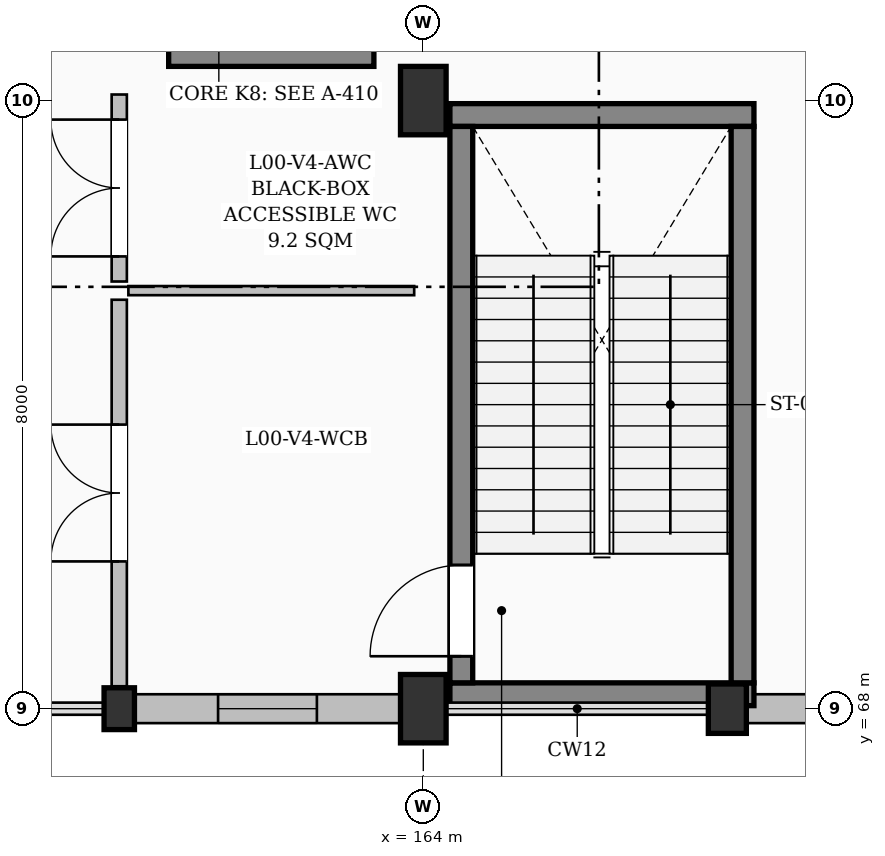
"""IFC4 building model, lengths in metres.
Left out: names, types, materials, properties, quantities, classifications, styles, units other than length and angle.
Written with IfcOpenShell. Run it as: python <this file> out.ifc"""

import sys

from ifc_helpers import new_model, si_unit, direction, frame, frame_2d, origin, origin_2d, place, context, subcontext, project, spatial, rectangle, extrude, element, fill, save


model = new_model("IFC4")
c1 = context("Model", 3, precision=1e-05, world=origin(), true_north=direction((0.0, 1.0)))
c2 = subcontext(c1, "Body", "Model", "MODEL_VIEW")
j1 = project(units=[si_unit("LENGTHUNIT", "METRE"), si_unit("PLANEANGLEUNIT", "RADIAN")], contexts=[c1])
p1 = place(None, origin())
s1 = spatial("IfcSite", under=j1, at=p1, CompositionType="ELEMENT")
p2 = place(p1, origin())
s2 = spatial("IfcBuilding", under=s1, at=p2, CompositionType="ELEMENT")
p3 = place(p2, origin())
s3 = spatial("IfcBuildingStorey", under=s2, at=p3, CompositionType="ELEMENT", Elevation=0.0)
p4 = place(p3, frame((160.0, 68.0, 0.0), z_axis=(0.0, 0.0, 1.0), x_axis=(1.0, 0.0, 0.0)))
e1 = element("IfcColumn", 1, at=p4, inside=s3, PredefinedType="PILASTER", context=c2, shape_type="SweptSolid", body=[
    extrude(rectangle(XDim=0.4, YDim=0.55, at=origin_2d()), origin(), (0.0, 0.0, 1.0), 4.8),
])
for number, where, z_axis, x_axis in (
    (2, (164.0, 68.0, 0.0), (0.0, 0.0, 1.0), (1.0, 0.0, 0.0)),
    (3, (164.0, 76.0, 0.0), (0.0, 0.0, 1.0), (1.0, 0.0, 0.0)),
):
    element("IfcColumn", number, at=place(p3, frame(where, z_axis=z_axis, x_axis=x_axis)), inside=s3, PredefinedType="COLUMN", context=c2, shape_type="SweptSolid", body=[
        extrude(rectangle(XDim=0.6, YDim=0.9, at=origin_2d()), origin(), (0.0, 0.0, 1.0), 4.8),
    ])
p5 = place(p3, frame((168.0, 68.0, 0.0), z_axis=(0.0, 0.0, 1.0), x_axis=(1.0, 0.0, 0.0)))
e4 = element("IfcColumn", 4, at=p5, inside=s3, PredefinedType="PILASTER", context=c2, shape_type="SweptSolid", body=[
    extrude(rectangle(XDim=0.5, YDim=0.65, at=origin_2d()), origin(), (0.0, 0.0, 1.0), 4.8),
])
p6 = place(p3, frame((171.675, 68.0, 0.0), z_axis=(0.0, 0.0, 1.0), x_axis=(-1.0, 0.0, 0.0)))
e5 = element("IfcWall", 5, at=p6, inside=s3, PredefinedType="SOLIDWALL", context=c2, shape_type="SweptSolid", body=[
    extrude(rectangle(XDim=3.425, YDim=0.38, at=frame_2d((1.712, 0.0))), origin(), (0.0, 0.0, 1.0), 4.035),
])
p7 = place(p6, frame((1.113, 0.0, 0.95)))
e6 = element("IfcOpeningElement", 6, at=p7, cuts=e5, PredefinedType="OPENING", context=c2, shape_type="SweptSolid", body=[
    extrude(rectangle(XDim=1.2, YDim=1.5, at=frame_2d((0.6, 0.75))), frame((0.0, 0.2, 0.0), z_axis=(0.0, -1.0, 0.0), x_axis=(1.0, 0.0, 0.0)), (0.0, 0.0, 1.0), 0.4),
])
p8 = place(p3, frame((163.7, 68.0, 0.0), z_axis=(0.0, 0.0, 1.0), x_axis=(-1.0, 0.0, 0.0)))
e7 = element("IfcWall", 7, at=p8, inside=s3, PredefinedType="SOLIDWALL", context=c2, shape_type="SweptSolid", body=[
    extrude(rectangle(XDim=3.5, YDim=0.38, at=frame_2d((1.75, 0.0))), origin(), (0.0, 0.0, 1.0), 4.235),
])
p9 = place(p8, frame((1.1, 0.0, 0.95)))
e8 = element("IfcOpeningElement", 8, at=p9, cuts=e7, PredefinedType="OPENING", context=c2, shape_type="SweptSolid", body=[
    extrude(rectangle(XDim=1.3, YDim=1.4, at=frame_2d((0.65, 0.7))), frame((0.0, 0.2, 0.0), z_axis=(0.0, -1.0, 0.0), x_axis=(1.0, 0.0, 0.0)), (0.0, 0.0, 1.0), 0.4),
])
for number, where, z_axis, x_axis in (
    (9, (164.35, 68.19, 0.0), (0.0, 0.0, 1.0), (1.0, 0.0, 0.0)),
    (10, (168.35, 75.81, 0.0), (0.0, 0.0, 1.0), (-1.0, 0.0, 0.0)),
):
    element("IfcWall", number, at=place(p3, frame(where, z_axis=z_axis, x_axis=x_axis)), inside=s3, PredefinedType="SHEAR", context=c2, shape_type="SweptSolid", body=[
        extrude(rectangle(XDim=4.0, YDim=0.3, at=frame_2d((2.0, 0.0))), origin(), (0.0, 0.0, 1.0), 4.55),
    ])
p10 = place(p3, frame((164.5, 68.34, 0.0), z_axis=(0.0, 0.0, 1.0), x_axis=(0.0, 1.0, 0.0)))
e11 = element("IfcWall", 11, at=p10, inside=s3, PredefinedType="SHEAR", context=c2, shape_type="SweptSolid", body=[
    extrude(rectangle(XDim=7.32, YDim=0.3, at=frame_2d((3.66, 0.0))), origin(), (0.0, 0.0, 1.0), 4.55),
])
p11 = place(p10, frame((0.35, 0.0, 0.0)))
e12 = element("IfcOpeningElement", 12, at=p11, cuts=e11, PredefinedType="OPENING", context=c2, shape_type="SweptSolid", body=[
    extrude(rectangle(XDim=1.2, YDim=2.15, at=frame_2d((0.6, 1.075))), frame((0.0, 0.16, 0.0), z_axis=(0.0, -1.0, 0.0), x_axis=(1.0, 0.0, 0.0)), (0.0, 0.0, 1.0), 0.32),
])
p12 = place(p3, frame((168.2, 75.66, 0.0), z_axis=(0.0, 0.0, 1.0), x_axis=(0.0, -1.0, 0.0)))
e13 = element("IfcWall", 13, at=p12, inside=s3, PredefinedType="SHEAR", context=c2, shape_type="SweptSolid", body=[
    extrude(rectangle(XDim=7.32, YDim=0.3, at=frame_2d((3.66, 0.0))), origin(), (0.0, 0.0, 1.0), 4.55),
])
p13 = place(p3, frame((160.65, 76.6, 0.0), z_axis=(0.0, 0.0, 1.0), x_axis=(1.0, 0.0, 0.0)))
e14 = element("IfcWall", 14, at=p13, inside=s3, PredefinedType="SHEAR", context=c2, shape_type="SweptSolid", body=[
    extrude(rectangle(XDim=2.7, YDim=0.3, at=frame_2d((1.35, 0.0))), origin(), (0.0, 0.0, 1.0), 4.55),
])
p14 = place(p3, frame((160.0, 68.295, 0.0), z_axis=(0.0, 0.0, 1.0), x_axis=(0.0, 1.0, 0.0)))
e15 = element("IfcWall", 15, at=p14, inside=s3, PredefinedType="PARTITIONING", context=c2, shape_type="SweptSolid", body=[
    extrude(rectangle(XDim=5.085, YDim=0.2, at=frame_2d((2.542, 0.0))), origin(), (0.0, 0.0, 1.0), 4.55),
])
p15 = place(p14, frame((1.643, 0.0, 0.0)))
e16 = element("IfcOpeningElement", 16, at=p15, cuts=e15, PredefinedType="OPENING", context=c2, shape_type="SweptSolid", body=[
    extrude(rectangle(XDim=1.8, YDim=2.35, at=frame_2d((0.9, 1.175))), frame((0.0, 0.11, 0.0), z_axis=(0.0, -1.0, 0.0), x_axis=(1.0, 0.0, 0.0)), (0.0, 0.0, 1.0), 0.22),
])
p16 = place(p3, frame((160.0, 73.62, 0.0), z_axis=(0.0, 0.0, 1.0), x_axis=(0.0, 1.0, 0.0)))
e17 = element("IfcWall", 17, at=p16, inside=s3, PredefinedType="PARTITIONING", context=c2, shape_type="SweptSolid", body=[
    extrude(rectangle(XDim=2.46, YDim=0.2, at=frame_2d((1.23, 0.0))), origin(), (0.0, 0.0, 1.0), 4.55),
])
p17 = place(p16, frame((0.33, 0.0, 0.0)))
e18 = element("IfcOpeningElement", 18, at=p17, cuts=e17, PredefinedType="OPENING", context=c2, shape_type="SweptSolid", body=[
    extrude(rectangle(XDim=1.8, YDim=2.35, at=frame_2d((0.9, 1.175))), frame((0.0, 0.11, 0.0), z_axis=(0.0, -1.0, 0.0), x_axis=(1.0, 0.0, 0.0)), (0.0, 0.0, 1.0), 0.22),
])
p18 = place(p3, frame((160.12, 73.5, 0.0), z_axis=(0.0, 0.0, 1.0), x_axis=(1.0, 0.0, 0.0)))
e19 = element("IfcWall", 19, at=p18, inside=s3, PredefinedType="PARTITIONING", context=c2, shape_type="SweptSolid", body=[
    extrude(rectangle(XDim=3.76, YDim=0.12, at=frame_2d((1.88, 0.0))), origin(), (0.0, 0.0, 1.0), 4.235),
])
p19 = place(p9, origin())
e20 = element("IfcWindow", 20, at=p19, inside=s3, PartitioningType="SINGLE_PANEL", PredefinedType="WINDOW", context=c2, shape_type="SweptSolid", body=[
    extrude(rectangle(XDim=1.3, YDim=1.4, at=frame_2d((0.65, 0.7))), frame((0.0, 0.03, 0.0), z_axis=(0.0, -1.0, 0.0), x_axis=(1.0, 0.0, 0.0)), (0.0, 0.0, 1.0), 0.06),
])
fill(e8, e20)
p20 = place(p11, origin())
e21 = element("IfcDoor", 21, at=p20, inside=s3, OperationType="SINGLE_SWING_LEFT", PredefinedType="DOOR", context=c2, shape_type="SweptSolid", body=[
    extrude(rectangle(XDim=1.2, YDim=2.15, at=frame_2d((0.6, 1.075))), frame((0.0, 0.025, 0.0), z_axis=(0.0, -1.0, 0.0), x_axis=(1.0, 0.0, 0.0)), (0.0, 0.0, 1.0), 0.05),
])
fill(e12, e21)
p21 = place(p15, origin())
e22 = element("IfcDoor", 22, at=p21, inside=s3, OperationType="DOUBLE_DOOR_SINGLE_SWING", PredefinedType="DOOR", context=c2, shape_type="SweptSolid", body=[
    extrude(rectangle(XDim=1.8, YDim=2.35, at=frame_2d((0.9, 1.175))), frame((0.0, 0.025, 0.0), z_axis=(0.0, -1.0, 0.0), x_axis=(1.0, 0.0, 0.0)), (0.0, 0.0, 1.0), 0.05),
])
fill(e16, e22)
p22 = place(p17, origin())
e23 = element("IfcDoor", 23, at=p22, inside=s3, OperationType="DOUBLE_DOOR_SINGLE_SWING", PredefinedType="DOOR", context=c2, shape_type="SweptSolid", body=[
    extrude(rectangle(XDim=1.8, YDim=2.35, at=frame_2d((0.9, 1.175))), frame((0.0, 0.025, 0.0), z_axis=(0.0, -1.0, 0.0), x_axis=(1.0, 0.0, 0.0)), (0.0, 0.0, 1.0), 0.05),
])
fill(e18, e23)
save(model, sys.argv[1])
